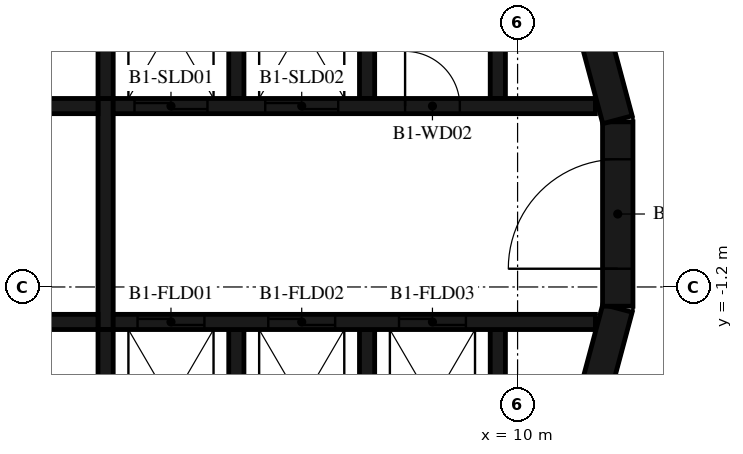
"""IFC4 building model, lengths in metres.
Left out: names, types, materials, properties, quantities, classifications, styles, units other than length and angle.
Written with IfcOpenShell. Run it as: python <this file> out.ifc"""

import sys

from ifc_helpers import new_model, si_unit, direction, frame, frame_2d, origin, place, context, subcontext, project, spatial, polyline, rectangle, outline, extrude, element, fill, save


model = new_model("IFC4")
c1 = context("Model", 3, precision=1e-05, world=origin(), true_north=direction((0.0, 1.0)))
c2 = subcontext(c1, "Body", "Model", "MODEL_VIEW")
j1 = project(units=[si_unit("LENGTHUNIT", "METRE"), si_unit("PLANEANGLEUNIT", "RADIAN")], contexts=[c1])
p1 = place(None, origin())
s1 = spatial("IfcSite", under=j1, at=p1, CompositionType="ELEMENT")
p2 = place(p1, origin())
s2 = spatial("IfcBuilding", under=s1, at=p2, CompositionType="ELEMENT")
p3 = place(p2, frame((0.0, 0.0, -4.2)))
s3 = spatial("IfcBuildingStorey", under=s2, at=p3, CompositionType="ELEMENT", Elevation=-4.2)
p4 = place(p3, frame((10.858, -4.479, 0.0), z_axis=(0.0, 0.0, 1.0), x_axis=(0.258734743916, 0.965948410781, 0.0)))
e1 = element("IfcWall", 1, at=p4, inside=s3, PredefinedType="SHEAR", context=c2, shape_type="SweptSolid", body=[
    extrude(rectangle(XDim=3.033, YDim=0.5, at=frame_2d((1.516, 0.0))), origin(), (0.0, 0.0, 1.0), 3.78),
])
p5 = place(p3, frame((11.647, -1.516, 0.0), z_axis=(0.0, 0.0, 1.0), x_axis=(0.0, 1.0, 0.0)))
e2 = element("IfcWall", 2, at=p5, inside=s3, PredefinedType="SHEAR", context=c2, shape_type="SweptSolid", body=[
    extrude(rectangle(XDim=3.033, YDim=0.5, at=frame_2d((1.516, 0.0))), origin(), (0.0, 0.0, 1.0), 3.78),
])
p6 = place(p5, frame((0.616, 0.0, 0.0)))
e3 = element("IfcOpeningElement", 3, at=p6, cuts=e2, PredefinedType="OPENING", context=c2, shape_type="SweptSolid", body=[
    extrude(rectangle(XDim=1.8, YDim=2.1, at=frame_2d((0.9, 1.05))), frame((0.0, 0.26, 0.0), z_axis=(0.0, -1.0, 0.0), x_axis=(1.0, 0.0, 0.0)), (0.0, 0.0, 1.0), 0.52),
])
p7 = place(p3, frame((11.643, 1.55, 0.0), z_axis=(0.0, 0.0, 1.0), x_axis=(-0.258734743916, 0.965948410781, 0.0)))
e4 = element("IfcWall", 4, at=p7, inside=s3, PredefinedType="SHEAR", context=c2, shape_type="SweptSolid", body=[
    extrude(rectangle(XDim=3.033, YDim=0.5, at=frame_2d((1.516, 0.0))), origin(), (0.0, 0.0, 1.0), 3.78),
])
p8 = place(p3, origin())
e5 = element("IfcWall", 5, at=p8, inside=s3, PredefinedType="SHEAR", context=c2, shape_type="SweptSolid", body=[
    extrude(outline(polyline([(-9.55, 4.8), (-7.65, 4.8), (-7.65, 1.9), (-7.4, 1.9), (-7.4, 4.8), (-5.5, 4.8), (-5.5, 1.9), (-5.25, 1.9), (-5.25, 4.8), (-3.35, 4.8), (-3.35, 1.9), (-3.1, 1.9), (-3.1, 4.8), (-1.2, 4.8), (-1.2, 1.9), (-0.95, 1.9), (-0.95, 4.8), (3.1, 4.8), (3.1, 1.9), (3.35, 1.9), (3.35, 4.8), (5.25, 4.8), (5.25, 1.9), (5.5, 1.9), (5.5, 4.8), (7.4, 4.8), (7.4, 1.9), (7.65, 1.9), (7.65, 4.8), (9.55, 4.8), (9.55, 1.9), (9.8, 1.9), (9.8, 4.8), (9.8, 5.05), (-9.8, 5.05), (-9.8, 4.8), (-9.8, 1.9), (-9.55, 1.9), (-9.55, 4.8)])), origin(), (0.0, 0.0, 1.0), 3.78),
])
p9 = place(p3, origin())
e6 = element("IfcWall", 6, at=p9, inside=s3, PredefinedType="SHEAR", context=c2, shape_type="SweptSolid", body=[
    extrude(outline(polyline([(9.8, -5.05), (9.8, -4.8), (9.8, -1.9), (9.55, -1.9), (9.55, -4.8), (7.65, -4.8), (7.65, -1.9), (7.4, -1.9), (7.4, -4.8), (5.5, -4.8), (5.5, -1.9), (5.25, -1.9), (5.25, -4.8), (3.35, -4.8), (3.35, -1.9), (3.1, -1.9), (3.1, -4.8), (-5.25, -4.8), (-5.25, -1.9), (-5.5, -1.9), (-5.5, -4.8), (-7.4, -4.8), (-7.4, -1.9), (-7.65, -1.9), (-7.65, -4.8), (-9.55, -4.8), (-9.55, -1.9), (-9.8, -1.9), (-9.8, -4.8), (-9.8, -5.05), (9.8, -5.05)])), origin(), (0.0, 0.0, 1.0), 3.78),
])
p10 = place(p3, frame((-11.28, 1.775, 0.0), z_axis=(0.0, 0.0, 1.0), x_axis=(1.0, 0.0, 0.0)))
e7 = element("IfcWall", 7, at=p10, inside=s3, PredefinedType="SHEAR", context=c2, shape_type="SweptSolid", body=[
    extrude(rectangle(XDim=14.38, YDim=0.25, at=frame_2d((7.19, 0.0))), origin(), (0.0, 0.0, 1.0), 3.78),
])
p11 = place(p10, frame((2.13, 0.0, 0.0)))
e8 = element("IfcOpeningElement", 8, at=p11, cuts=e7, PredefinedType="OPENING", context=c2, shape_type="SweptSolid", body=[
    extrude(rectangle(XDim=1.1, YDim=2.1, at=frame_2d((0.55, 1.05))), frame((0.0, 0.135, 0.0), z_axis=(0.0, -1.0, 0.0), x_axis=(1.0, 0.0, 0.0)), (0.0, 0.0, 1.0), 0.27),
])
p12 = place(p10, frame((4.28, 0.0, 0.0)))
e9 = element("IfcOpeningElement", 9, at=p12, cuts=e7, PredefinedType="OPENING", context=c2, shape_type="SweptSolid", body=[
    extrude(rectangle(XDim=1.1, YDim=2.1, at=frame_2d((0.55, 1.05))), frame((0.0, 0.135, 0.0), z_axis=(0.0, -1.0, 0.0), x_axis=(1.0, 0.0, 0.0)), (0.0, 0.0, 1.0), 0.27),
])
p13 = place(p10, frame((6.43, 0.0, 0.0)))
e10 = element("IfcOpeningElement", 10, at=p13, cuts=e7, PredefinedType="OPENING", context=c2, shape_type="SweptSolid", body=[
    extrude(rectangle(XDim=1.1, YDim=2.1, at=frame_2d((0.55, 1.05))), frame((0.0, 0.135, 0.0), z_axis=(0.0, -1.0, 0.0), x_axis=(1.0, 0.0, 0.0)), (0.0, 0.0, 1.0), 0.27),
])
p14 = place(p10, frame((8.58, 0.0, 0.0)))
e11 = element("IfcOpeningElement", 11, at=p14, cuts=e7, PredefinedType="OPENING", context=c2, shape_type="SweptSolid", body=[
    extrude(rectangle(XDim=1.1, YDim=2.1, at=frame_2d((0.55, 1.05))), frame((0.0, 0.135, 0.0), z_axis=(0.0, -1.0, 0.0), x_axis=(1.0, 0.0, 0.0)), (0.0, 0.0, 1.0), 0.27),
])
p15 = place(p10, frame((11.905, 0.0, 0.0)))
e12 = element("IfcOpeningElement", 12, at=p15, cuts=e7, PredefinedType="OPENING", context=c2, shape_type="SweptSolid", body=[
    extrude(rectangle(XDim=0.9, YDim=2.1, at=frame_2d((0.45, 1.05))), frame((0.0, 0.135, 0.0), z_axis=(0.0, -1.0, 0.0), x_axis=(1.0, 0.0, 0.0)), (0.0, 0.0, 1.0), 0.27),
])
p16 = place(p3, frame((3.35, 1.775, 0.0), z_axis=(0.0, 0.0, 1.0), x_axis=(1.0, 0.0, 0.0)))
e13 = element("IfcWall", 13, at=p16, inside=s3, PredefinedType="SHEAR", context=c2, shape_type="SweptSolid", body=[
    extrude(rectangle(XDim=7.93, YDim=0.25, at=frame_2d((3.965, 0.0))), origin(), (0.0, 0.0, 1.0), 3.78),
])
p17 = place(p16, frame((0.35, 0.0, 0.0)))
e14 = element("IfcOpeningElement", 14, at=p17, cuts=e13, PredefinedType="OPENING", context=c2, shape_type="SweptSolid", body=[
    extrude(rectangle(XDim=1.2, YDim=2.4, at=frame_2d((0.6, 1.2))), frame((0.0, 0.135, 0.0), z_axis=(0.0, -1.0, 0.0), x_axis=(1.0, 0.0, 0.0)), (0.0, 0.0, 1.0), 0.27),
])
p18 = place(p16, frame((2.5, 0.0, 0.0)))
e15 = element("IfcOpeningElement", 15, at=p18, cuts=e13, PredefinedType="OPENING", context=c2, shape_type="SweptSolid", body=[
    extrude(rectangle(XDim=1.2, YDim=2.4, at=frame_2d((0.6, 1.2))), frame((0.0, 0.135, 0.0), z_axis=(0.0, -1.0, 0.0), x_axis=(1.0, 0.0, 0.0)), (0.0, 0.0, 1.0), 0.27),
])
p19 = place(p16, frame((4.8, 0.0, 0.0)))
e16 = element("IfcOpeningElement", 16, at=p19, cuts=e13, PredefinedType="OPENING", context=c2, shape_type="SweptSolid", body=[
    extrude(rectangle(XDim=0.9, YDim=2.1, at=frame_2d((0.45, 1.05))), frame((0.0, 0.135, 0.0), z_axis=(0.0, -1.0, 0.0), x_axis=(1.0, 0.0, 0.0)), (0.0, 0.0, 1.0), 0.27),
])
p20 = place(p3, frame((-11.28, -1.775, 0.0), z_axis=(0.0, 0.0, 1.0), x_axis=(1.0, 0.0, 0.0)))
e17 = element("IfcWall", 17, at=p20, inside=s3, PredefinedType="SHEAR", context=c2, shape_type="SweptSolid", body=[
    extrude(rectangle(XDim=14.38, YDim=0.25, at=frame_2d((7.19, 0.0))), origin(), (0.0, 0.0, 1.0), 3.78),
])
p21 = place(p20, frame((2.03, 0.0, 0.0)))
e18 = element("IfcOpeningElement", 18, at=p21, cuts=e17, PredefinedType="OPENING", context=c2, shape_type="SweptSolid", body=[
    extrude(rectangle(XDim=1.3, YDim=2.1, at=frame_2d((0.65, 1.05))), frame((0.0, 0.135, 0.0), z_axis=(0.0, -1.0, 0.0), x_axis=(1.0, 0.0, 0.0)), (0.0, 0.0, 1.0), 0.27),
])
p22 = place(p20, frame((4.18, 0.0, 0.0)))
e19 = element("IfcOpeningElement", 19, at=p22, cuts=e17, PredefinedType="OPENING", context=c2, shape_type="SweptSolid", body=[
    extrude(rectangle(XDim=1.3, YDim=2.1, at=frame_2d((0.65, 1.05))), frame((0.0, 0.135, 0.0), z_axis=(0.0, -1.0, 0.0), x_axis=(1.0, 0.0, 0.0)), (0.0, 0.0, 1.0), 0.27),
])
p23 = place(p20, frame((9.755, 0.0, 0.0)))
e20 = element("IfcOpeningElement", 20, at=p23, cuts=e17, PredefinedType="OPENING", context=c2, shape_type="SweptSolid", body=[
    extrude(rectangle(XDim=0.9, YDim=2.1, at=frame_2d((0.45, 1.05))), frame((0.0, 0.135, 0.0), z_axis=(0.0, -1.0, 0.0), x_axis=(1.0, 0.0, 0.0)), (0.0, 0.0, 1.0), 0.27),
])
p24 = place(p3, frame((3.35, -1.775, 0.0), z_axis=(0.0, 0.0, 1.0), x_axis=(1.0, 0.0, 0.0)))
e21 = element("IfcWall", 21, at=p24, inside=s3, PredefinedType="SHEAR", context=c2, shape_type="SweptSolid", body=[
    extrude(rectangle(XDim=7.93, YDim=0.25, at=frame_2d((3.965, 0.0))), origin(), (0.0, 0.0, 1.0), 3.78),
])
p25 = place(p24, frame((0.4, 0.0, 0.0)))
e22 = element("IfcOpeningElement", 22, at=p25, cuts=e21, PredefinedType="OPENING", context=c2, shape_type="SweptSolid", body=[
    extrude(rectangle(XDim=1.1, YDim=2.4, at=frame_2d((0.55, 1.2))), frame((0.0, 0.135, 0.0), z_axis=(0.0, -1.0, 0.0), x_axis=(1.0, 0.0, 0.0)), (0.0, 0.0, 1.0), 0.27),
])
p26 = place(p24, frame((2.55, 0.0, 0.0)))
e23 = element("IfcOpeningElement", 23, at=p26, cuts=e21, PredefinedType="OPENING", context=c2, shape_type="SweptSolid", body=[
    extrude(rectangle(XDim=1.1, YDim=2.4, at=frame_2d((0.55, 1.2))), frame((0.0, 0.135, 0.0), z_axis=(0.0, -1.0, 0.0), x_axis=(1.0, 0.0, 0.0)), (0.0, 0.0, 1.0), 0.27),
])
p27 = place(p24, frame((4.7, 0.0, 0.0)))
e24 = element("IfcOpeningElement", 24, at=p27, cuts=e21, PredefinedType="OPENING", context=c2, shape_type="SweptSolid", body=[
    extrude(rectangle(XDim=1.1, YDim=2.4, at=frame_2d((0.55, 1.2))), frame((0.0, 0.135, 0.0), z_axis=(0.0, -1.0, 0.0), x_axis=(1.0, 0.0, 0.0)), (0.0, 0.0, 1.0), 0.27),
])
p28 = place(p3, frame((3.225, -1.9, 0.0), z_axis=(0.0, 0.0, 1.0), x_axis=(0.0, 1.0, 0.0)))
e25 = element("IfcWall", 25, at=p28, inside=s3, PredefinedType="SHEAR", context=c2, shape_type="SweptSolid", body=[
    extrude(rectangle(XDim=3.8, YDim=0.25, at=frame_2d((1.9, 0.0))), origin(), (0.0, 0.0, 1.0), 3.78),
])
p29 = place(p6, origin())
e26 = element("IfcDoor", 26, at=p29, inside=s3, OperationType="DOUBLE_DOOR_SINGLE_SWING", PredefinedType="DOOR", context=c2, shape_type="SweptSolid", body=[
    extrude(rectangle(XDim=1.8, YDim=2.1, at=frame_2d((0.9, 1.05))), frame((0.0, 0.025, 0.0), z_axis=(0.0, -1.0, 0.0), x_axis=(1.0, 0.0, 0.0)), (0.0, 0.0, 1.0), 0.05),
])
fill(e3, e26)
p30 = place(p17, origin())
e27 = element("IfcDoor", 27, at=p30, inside=s3, OperationType="DOUBLE_DOOR_SLIDING", PredefinedType="DOOR", context=c2, shape_type="SweptSolid", body=[
    extrude(rectangle(XDim=1.2, YDim=2.4, at=frame_2d((0.6, 1.2))), frame((0.0, 0.025, 0.0), z_axis=(0.0, -1.0, 0.0), x_axis=(1.0, 0.0, 0.0)), (0.0, 0.0, 1.0), 0.05),
])
fill(e14, e27)
p31 = place(p18, origin())
e28 = element("IfcDoor", 28, at=p31, inside=s3, OperationType="DOUBLE_DOOR_SLIDING", PredefinedType="DOOR", context=c2, shape_type="SweptSolid", body=[
    extrude(rectangle(XDim=1.2, YDim=2.4, at=frame_2d((0.6, 1.2))), frame((0.0, 0.025, 0.0), z_axis=(0.0, -1.0, 0.0), x_axis=(1.0, 0.0, 0.0)), (0.0, 0.0, 1.0), 0.05),
])
fill(e15, e28)
p32 = place(p25, origin())
e29 = element("IfcDoor", 29, at=p32, inside=s3, OperationType="DOUBLE_DOOR_SLIDING", PredefinedType="DOOR", context=c2, shape_type="SweptSolid", body=[
    extrude(rectangle(XDim=1.1, YDim=2.4, at=frame_2d((0.55, 1.2))), frame((0.0, 0.025, 0.0), z_axis=(0.0, -1.0, 0.0), x_axis=(1.0, 0.0, 0.0)), (0.0, 0.0, 1.0), 0.05),
])
fill(e22, e29)
p33 = place(p26, origin())
e30 = element("IfcDoor", 30, at=p33, inside=s3, OperationType="DOUBLE_DOOR_SLIDING", PredefinedType="DOOR", context=c2, shape_type="SweptSolid", body=[
    extrude(rectangle(XDim=1.1, YDim=2.4, at=frame_2d((0.55, 1.2))), frame((0.0, 0.025, 0.0), z_axis=(0.0, -1.0, 0.0), x_axis=(1.0, 0.0, 0.0)), (0.0, 0.0, 1.0), 0.05),
])
fill(e23, e30)
p34 = place(p27, origin())
e31 = element("IfcDoor", 31, at=p34, inside=s3, OperationType="DOUBLE_DOOR_SLIDING", PredefinedType="DOOR", context=c2, shape_type="SweptSolid", body=[
    extrude(rectangle(XDim=1.1, YDim=2.4, at=frame_2d((0.55, 1.2))), frame((0.0, 0.025, 0.0), z_axis=(0.0, -1.0, 0.0), x_axis=(1.0, 0.0, 0.0)), (0.0, 0.0, 1.0), 0.05),
])
fill(e24, e31)
p35 = place(p19, origin())
e32 = element("IfcDoor", 32, at=p35, inside=s3, OperationType="SINGLE_SWING_LEFT", PredefinedType="DOOR", context=c2, shape_type="SweptSolid", body=[
    extrude(rectangle(XDim=0.9, YDim=2.1, at=frame_2d((0.45, 1.05))), frame((0.0, 0.025, 0.0), z_axis=(0.0, -1.0, 0.0), x_axis=(1.0, 0.0, 0.0)), (0.0, 0.0, 1.0), 0.05),
])
fill(e16, e32)
save(model, sys.argv[1])
